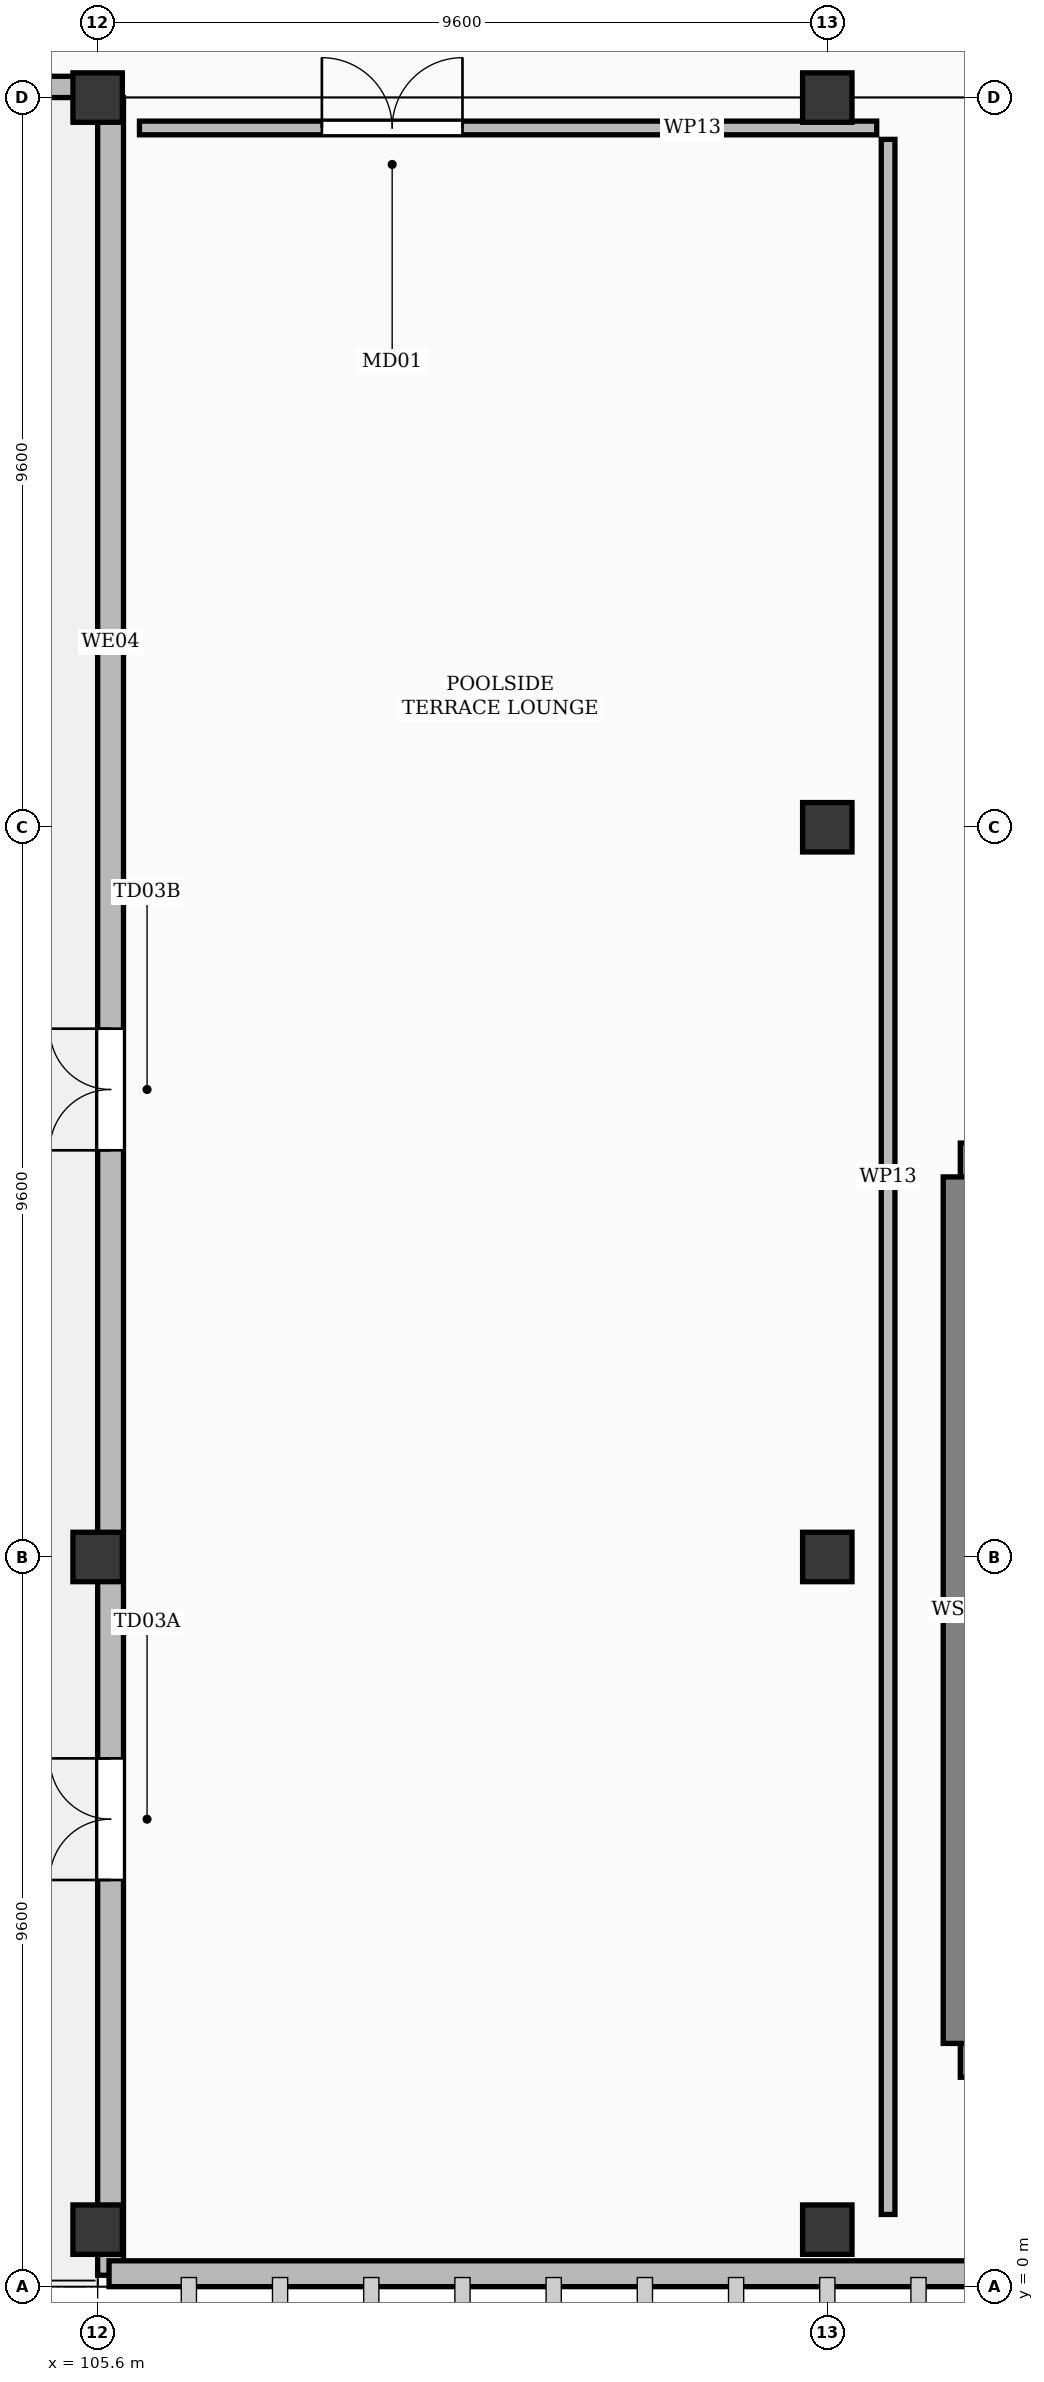
"""IFC4 building model, lengths in metres.
Left out: names, types, materials, properties, quantities, classifications, styles, units other than length and angle.
Written with IfcOpenShell. Run it as: python <this file> out.ifc"""

import sys

from ifc_helpers import new_model, si_unit, direction, frame, frame_2d, origin, origin_2d, place, context, subcontext, project, spatial, rectangle, extrude, element, fill, save


model = new_model("IFC4")
c1 = context("Model", 3, precision=1e-05, world=origin(), true_north=direction((0.0, 1.0)))
c2 = subcontext(c1, "Body", "Model", "MODEL_VIEW")
j1 = project(units=[si_unit("LENGTHUNIT", "METRE"), si_unit("PLANEANGLEUNIT", "RADIAN")], contexts=[c1])
p1 = place(None, origin())
s1 = spatial("IfcSite", under=j1, at=p1, CompositionType="ELEMENT")
p2 = place(p1, origin())
s2 = spatial("IfcBuilding", under=s1, at=p2, CompositionType="ELEMENT")
p3 = place(p2, frame((0.0, 0.0, 16.2)))
s3 = spatial("IfcBuildingStorey", under=s2, at=p3, CompositionType="ELEMENT", Elevation=16.2)
for number, where, z_axis, x_axis in (
    (1, (105.6, 0.75, 0.0), (0.0, 0.0, 1.0), (1.0, 0.0, 0.0)),
    (2, (105.6, 9.6, 0.0), (0.0, 0.0, 1.0), (1.0, 0.0, 0.0)),
    (3, (105.6, 28.8, 0.0), (0.0, 0.0, 1.0), (1.0, 0.0, 0.0)),
    (4, (115.2, 0.75, 0.0), (0.0, 0.0, 1.0), (1.0, 0.0, 0.0)),
    (5, (115.2, 9.6, 0.0), (0.0, 0.0, 1.0), (1.0, 0.0, 0.0)),
    (6, (115.2, 19.2, 0.0), (0.0, 0.0, 1.0), (1.0, 0.0, 0.0)),
    (7, (115.2, 28.8, 0.0), (0.0, 0.0, 1.0), (1.0, 0.0, 0.0)),
):
    element("IfcColumn", number, at=place(p3, frame(where, z_axis=z_axis, x_axis=x_axis)), inside=s3, PredefinedType="COLUMN", context=c2, shape_type="SweptSolid", body=[
        extrude(rectangle(XDim=0.65, YDim=0.65, at=origin_2d()), origin(), (0.0, 0.0, 1.0), 4.8),
    ])
p4 = place(p3, frame((105.77, 0.15, 0.0), z_axis=(0.0, 0.0, 1.0), x_axis=(0.0, 1.0, 0.0)))
e8 = element("IfcWall", 8, at=p4, inside=s3, PredefinedType="SOLIDWALL", context=c2, shape_type="SweptSolid", body=[
    extrude(rectangle(XDim=28.65, YDim=0.34, at=frame_2d((14.325, 0.0))), origin(), (0.0, 0.0, 1.0), 3.732),
])
p5 = place(p4, frame((5.2, 0.0, 0.0)))
e9 = element("IfcOpeningElement", 9, at=p5, cuts=e8, PredefinedType="OPENING", context=c2, shape_type="SweptSolid", body=[
    extrude(rectangle(XDim=1.6, YDim=2.25, at=frame_2d((0.8, 1.125))), frame((0.0, 0.182, 0.0), z_axis=(0.0, -1.0, 0.0), x_axis=(1.0, 0.0, 0.0)), (0.0, 0.0, 1.0), 0.364),
])
p6 = place(p4, frame((14.8, 0.0, 0.0)))
e10 = element("IfcOpeningElement", 10, at=p6, cuts=e8, PredefinedType="OPENING", context=c2, shape_type="SweptSolid", body=[
    extrude(rectangle(XDim=1.6, YDim=2.25, at=frame_2d((0.8, 1.125))), frame((0.0, 0.182, 0.0), z_axis=(0.0, -1.0, 0.0), x_axis=(1.0, 0.0, 0.0)), (0.0, 0.0, 1.0), 0.364),
])
p7 = place(p3, frame((149.05, 0.17, 0.0), z_axis=(0.0, 0.0, 1.0), x_axis=(-1.0, 0.0, 0.0)))
e11 = element("IfcWall", 11, at=p7, inside=s3, PredefinedType="SOLIDWALL", context=c2, shape_type="SweptSolid", body=[
    extrude(rectangle(XDim=43.3, YDim=0.34, at=frame_2d((21.65, 0.0))), origin(), (0.0, 0.0, 1.0), 3.032),
])
p8 = place(p3, frame((57.6, 28.94, 4.8), z_axis=(0.0, 0.0, 1.0), x_axis=(1.0, 0.0, 0.0)))
e12 = element("IfcWall", 12, at=p8, inside=s3, PredefinedType="PARAPET", context=c2, shape_type="SweptSolid", body=[
    extrude(rectangle(XDim=48.0, YDim=0.28, at=frame_2d((24.0, 0.0))), origin(), (0.0, 0.0, 1.0), 1.25),
])
for number, where, z_axis, x_axis in (
    (13, (116.95, 2.98, 0.0), (0.0, 0.0, 1.0), (1.0, 0.0, 0.0)),
    (14, (116.95, 14.82, 0.0), (0.0, 0.0, 1.0), (1.0, 0.0, 0.0)),
):
    element("IfcWall", number, at=place(p3, frame(where, z_axis=z_axis, x_axis=x_axis)), inside=s3, PredefinedType="SHEAR", context=c2, shape_type="SweptSolid", body=[
        extrude(rectangle(XDim=5.15, YDim=0.45, at=frame_2d((2.575, 0.0))), origin(), (0.0, 0.0, 1.0), 4.54),
    ])
p9 = place(p3, frame((116.95, 3.2, 0.0), z_axis=(0.0, 0.0, 1.0), x_axis=(0.0, 1.0, 0.0)))
e15 = element("IfcWall", 15, at=p9, inside=s3, PredefinedType="SHEAR", context=c2, shape_type="SweptSolid", body=[
    extrude(rectangle(XDim=11.4, YDim=0.45, at=frame_2d((5.7, 0.0))), origin(), (0.0, 0.0, 1.0), 4.54),
])
p10 = place(p3, frame((106.15, 28.4, 0.0), z_axis=(0.0, 0.0, 1.0), x_axis=(1.0, 0.0, 0.0)))
e16 = element("IfcWall", 16, at=p10, inside=s3, PredefinedType="PARTITIONING", context=c2, shape_type="SweptSolid", body=[
    extrude(rectangle(XDim=9.7, YDim=0.18, at=frame_2d((4.85, 0.0))), origin(), (0.0, 0.0, 1.0), 3.732),
])
p11 = place(p10, frame((2.4, 0.0, 0.0)))
e17 = element("IfcOpeningElement", 17, at=p11, cuts=e16, PredefinedType="OPENING", context=c2, shape_type="SweptSolid", body=[
    extrude(rectangle(XDim=1.85, YDim=2.35, at=frame_2d((0.925, 1.175))), frame((0.0, 0.102, 0.0), z_axis=(0.0, -1.0, 0.0), x_axis=(1.0, 0.0, 0.0)), (0.0, 0.0, 1.0), 0.204),
])
p12 = place(p3, frame((116.0, 0.95, 0.0), z_axis=(0.0, 0.0, 1.0), x_axis=(0.0, 1.0, 0.0)))
e18 = element("IfcWall", 18, at=p12, inside=s3, PredefinedType="PARTITIONING", context=c2, shape_type="SweptSolid", body=[
    extrude(rectangle(XDim=27.3, YDim=0.18, at=frame_2d((13.65, 0.0))), origin(), (0.0, 0.0, 1.0), 3.732),
])
p13 = place(p5, origin())
e19 = element("IfcDoor", 19, at=p13, inside=s3, OperationType="DOUBLE_DOOR_SINGLE_SWING", PredefinedType="DOOR", context=c2, shape_type="SweptSolid", body=[
    extrude(rectangle(XDim=1.6, YDim=2.25, at=frame_2d((0.8, 1.125))), frame((0.0, 0.025, 0.0), z_axis=(0.0, -1.0, 0.0), x_axis=(1.0, 0.0, 0.0)), (0.0, 0.0, 1.0), 0.05),
])
fill(e9, e19)
p14 = place(p6, origin())
e20 = element("IfcDoor", 20, at=p14, inside=s3, OperationType="DOUBLE_DOOR_SINGLE_SWING", PredefinedType="DOOR", context=c2, shape_type="SweptSolid", body=[
    extrude(rectangle(XDim=1.6, YDim=2.25, at=frame_2d((0.8, 1.125))), frame((0.0, 0.025, 0.0), z_axis=(0.0, -1.0, 0.0), x_axis=(1.0, 0.0, 0.0)), (0.0, 0.0, 1.0), 0.05),
])
fill(e10, e20)
p15 = place(p11, origin())
e21 = element("IfcDoor", 21, at=p15, inside=s3, OperationType="DOUBLE_DOOR_SINGLE_SWING", PredefinedType="DOOR", context=c2, shape_type="SweptSolid", body=[
    extrude(rectangle(XDim=1.85, YDim=2.35, at=frame_2d((0.925, 1.175))), frame((0.0, 0.025, 0.0), z_axis=(0.0, -1.0, 0.0), x_axis=(1.0, 0.0, 0.0)), (0.0, 0.0, 1.0), 0.05),
])
fill(e17, e21)
save(model, sys.argv[1])
